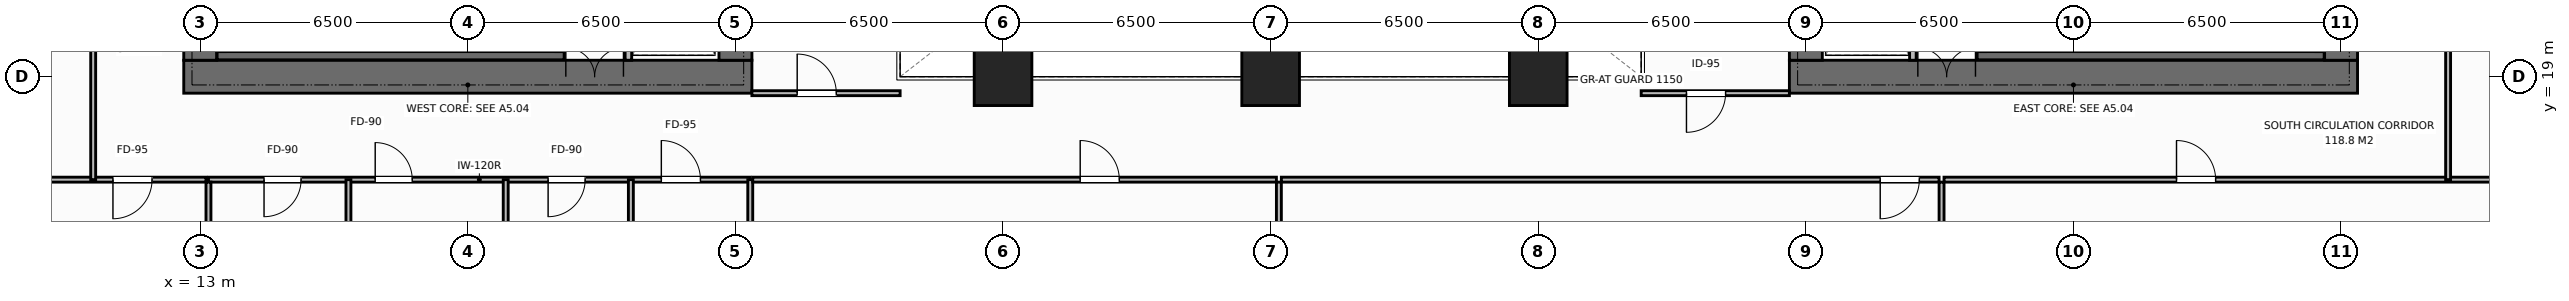
"""IFC4 building model, lengths in metres.
Left out: names, types, materials, properties, quantities, classifications, styles, units other than length and angle.
Written with IfcOpenShell. Run it as: python <this file> out.ifc"""

import sys

from ifc_helpers import new_model, si_unit, direction, frame, frame_2d, origin, origin_2d, place, context, subcontext, project, spatial, rectangle, extrude, element, fill, save


model = new_model("IFC4")
c1 = context("Model", 3, precision=1e-05, world=origin(), true_north=direction((0.0, 1.0)))
c2 = subcontext(c1, "Body", "Model", "MODEL_VIEW")
j1 = project(units=[si_unit("LENGTHUNIT", "METRE"), si_unit("PLANEANGLEUNIT", "RADIAN")], contexts=[c1])
p1 = place(None, origin())
s1 = spatial("IfcSite", under=j1, at=p1, CompositionType="ELEMENT")
p2 = place(p1, origin())
s2 = spatial("IfcBuilding", under=s1, at=p2, CompositionType="ELEMENT")
p3 = place(p2, frame((0.0, 0.0, 46.8)))
s3 = spatial("IfcBuildingStorey", under=s2, at=p3, CompositionType="ELEMENT", Elevation=46.8)
p4 = place(p3, frame((12.6, 19.0, 0.0), z_axis=(0.0, 0.0, 1.0), x_axis=(1.0, 0.0, 0.0)))
e1 = element("IfcWall", 1, at=p4, inside=s3, PredefinedType="SHEAR", context=c2, shape_type="SweptSolid", body=[
    extrude(rectangle(XDim=13.8, YDim=0.8, at=frame_2d((6.9, 0.0))), origin(), (0.0, 0.0, 1.0), 3.8),
])
p5 = place(p4, frame((9.28, 0.0, 0.0)))
e2 = element("IfcOpeningElement", 2, at=p5, cuts=e1, PredefinedType="OPENING", context=c2, shape_type="SweptSolid", body=[
    extrude(rectangle(XDim=1.4, YDim=2.2, at=frame_2d((0.7, 1.1))), frame((0.0, 0.41, 0.0), z_axis=(0.0, -1.0, 0.0), x_axis=(1.0, 0.0, 0.0)), (0.0, 0.0, 1.0), 0.82),
])
p6 = place(p3, frame((13.0, 19.4, 0.0), z_axis=(0.0, 0.0, 1.0), x_axis=(0.0, 1.0, 0.0)))
e3 = element("IfcWall", 3, at=p6, inside=s3, PredefinedType="SHEAR", context=c2, shape_type="SweptSolid", body=[
    extrude(rectangle(XDim=13.2, YDim=0.8, at=frame_2d((6.6, 0.0))), origin(), (0.0, 0.0, 1.0), 3.8),
])
p7 = place(p6, frame((4.65, 0.0, 0.0)))
e4 = element("IfcOpeningElement", 4, at=p7, cuts=e3, PredefinedType="OPENING", context=c2, shape_type="SweptSolid", body=[
    extrude(rectangle(XDim=1.4, YDim=2.2, at=frame_2d((0.7, 1.1))), frame((0.0, 0.41, 0.0), z_axis=(0.0, -1.0, 0.0), x_axis=(1.0, 0.0, 0.0)), (0.0, 0.0, 1.0), 0.82),
])
p8 = place(p3, frame((26.0, 19.4, 0.0), z_axis=(0.0, 0.0, 1.0), x_axis=(0.0, 1.0, 0.0)))
e5 = element("IfcWall", 5, at=p8, inside=s3, PredefinedType="SHEAR", context=c2, shape_type="SweptSolid", body=[
    extrude(rectangle(XDim=13.2, YDim=0.8, at=frame_2d((6.6, 0.0))), origin(), (0.0, 0.0, 1.0), 3.8),
])
p9 = place(p3, frame((51.6, 19.0, 0.0), z_axis=(0.0, 0.0, 1.0), x_axis=(1.0, 0.0, 0.0)))
e6 = element("IfcWall", 6, at=p9, inside=s3, PredefinedType="SHEAR", context=c2, shape_type="SweptSolid", body=[
    extrude(rectangle(XDim=13.8, YDim=0.8, at=frame_2d((6.9, 0.0))), origin(), (0.0, 0.0, 1.0), 3.8),
])
p10 = place(p9, frame((3.12, 0.0, 0.0)))
e7 = element("IfcOpeningElement", 7, at=p10, cuts=e6, PredefinedType="OPENING", context=c2, shape_type="SweptSolid", body=[
    extrude(rectangle(XDim=1.4, YDim=2.2, at=frame_2d((0.7, 1.1))), frame((0.0, 0.41, 0.0), z_axis=(0.0, -1.0, 0.0), x_axis=(1.0, 0.0, 0.0)), (0.0, 0.0, 1.0), 0.82),
])
p11 = place(p3, frame((52.0, 19.4, 0.0), z_axis=(0.0, 0.0, 1.0), x_axis=(0.0, 1.0, 0.0)))
e8 = element("IfcWall", 8, at=p11, inside=s3, PredefinedType="SHEAR", context=c2, shape_type="SweptSolid", body=[
    extrude(rectangle(XDim=13.2, YDim=0.8, at=frame_2d((6.6, 0.0))), origin(), (0.0, 0.0, 1.0), 3.8),
])
p12 = place(p3, frame((65.0, 19.4, 0.0), z_axis=(0.0, 0.0, 1.0), x_axis=(0.0, 1.0, 0.0)))
e9 = element("IfcWall", 9, at=p12, inside=s3, PredefinedType="SHEAR", context=c2, shape_type="SweptSolid", body=[
    extrude(rectangle(XDim=13.2, YDim=0.8, at=frame_2d((6.6, 0.0))), origin(), (0.0, 0.0, 1.0), 3.8),
])
p13 = place(p12, frame((8.05, 0.0, 0.0)))
e10 = element("IfcOpeningElement", 10, at=p13, cuts=e9, PredefinedType="OPENING", context=c2, shape_type="SweptSolid", body=[
    extrude(rectangle(XDim=1.3, YDim=2.2, at=frame_2d((0.65, 1.1))), frame((0.0, 0.41, 0.0), z_axis=(0.0, -1.0, 0.0), x_axis=(1.0, 0.0, 0.0)), (0.0, 0.0, 1.0), 0.82),
])
for number, where, z_axis, x_axis in (
    (11, (13.41, 19.51, 0.0), (0.0, 0.0, 1.0), (1.0, 0.0, 0.0)),
    (12, (56.16, 19.51, 0.0), (0.0, 0.0, 1.0), (1.0, 0.0, 0.0)),
):
    element("IfcWall", number, at=place(p3, frame(where, z_axis=z_axis, x_axis=x_axis)), inside=s3, PredefinedType="SHEAR", context=c2, shape_type="SweptSolid", body=[
        extrude(rectangle(XDim=8.43, YDim=0.2, at=frame_2d((4.215, 0.0))), origin(), (0.0, 0.0, 1.0), 3.8),
    ])
for number, where, z_axis, x_axis in (
    (13, (32.5, 19.0, 0.0), (0.0, 0.0, 1.0), (1.0, 0.0, 0.0)),
    (14, (39.0, 19.0, 0.0), (0.0, 0.0, 1.0), (1.0, 0.0, 0.0)),
    (15, (45.5, 19.0, 0.0), (0.0, 0.0, 1.0), (1.0, 0.0, 0.0)),
):
    element("IfcColumn", number, at=place(p3, frame(where, z_axis=z_axis, x_axis=x_axis)), inside=s3, PredefinedType="COLUMN", context=c2, shape_type="SweptSolid", body=[
        extrude(rectangle(XDim=1.4, YDim=1.4, at=origin_2d()), origin(), (0.0, 0.0, 1.0), 3.8),
    ])
p14 = place(p3, frame((23.4, 19.4, 0.0), z_axis=(0.0, 0.0, 1.0), x_axis=(0.0, 1.0, 0.0)))
e16 = element("IfcWall", 16, at=p14, inside=s3, PredefinedType="STANDARD", context=c2, shape_type="SweptSolid", body=[
    extrude(rectangle(XDim=13.2, YDim=0.16, at=frame_2d((6.6, 0.0))), origin(), (0.0, 0.0, 1.0), 3.55),
])
p15 = place(p14, frame((0.55, 0.0, 0.0)))
e17 = element("IfcOpeningElement", 17, at=p15, cuts=e16, PredefinedType="OPENING", context=c2, shape_type="SweptSolid", body=[
    extrude(rectangle(XDim=1.1, YDim=2.2, at=frame_2d((0.55, 1.1))), frame((0.0, 0.09, 0.0), z_axis=(0.0, -1.0, 0.0), x_axis=(1.0, 0.0, 0.0)), (0.0, 0.0, 1.0), 0.18),
])
p16 = place(p14, frame((2.7, 0.0, 0.0)))
e18 = element("IfcOpeningElement", 18, at=p16, cuts=e16, PredefinedType="OPENING", context=c2, shape_type="SweptSolid", body=[
    extrude(rectangle(XDim=1.1, YDim=2.2, at=frame_2d((0.55, 1.1))), frame((0.0, 0.09, 0.0), z_axis=(0.0, -1.0, 0.0), x_axis=(1.0, 0.0, 0.0)), (0.0, 0.0, 1.0), 0.18),
])
p17 = place(p3, frame((54.6, 19.4, 0.0), z_axis=(0.0, 0.0, 1.0), x_axis=(0.0, 1.0, 0.0)))
e19 = element("IfcWall", 19, at=p17, inside=s3, PredefinedType="STANDARD", context=c2, shape_type="SweptSolid", body=[
    extrude(rectangle(XDim=13.2, YDim=0.16, at=frame_2d((6.6, 0.0))), origin(), (0.0, 0.0, 1.0), 3.55),
])
p18 = place(p17, frame((0.55, 0.0, 0.0)))
e20 = element("IfcOpeningElement", 20, at=p18, cuts=e19, PredefinedType="OPENING", context=c2, shape_type="SweptSolid", body=[
    extrude(rectangle(XDim=1.1, YDim=2.2, at=frame_2d((0.55, 1.1))), frame((0.0, 0.09, 0.0), z_axis=(0.0, -1.0, 0.0), x_axis=(1.0, 0.0, 0.0)), (0.0, 0.0, 1.0), 0.18),
])
p19 = place(p17, frame((2.7, 0.0, 0.0)))
e21 = element("IfcOpeningElement", 21, at=p19, cuts=e19, PredefinedType="OPENING", context=c2, shape_type="SweptSolid", body=[
    extrude(rectangle(XDim=1.1, YDim=2.2, at=frame_2d((0.55, 1.1))), frame((0.0, 0.09, 0.0), z_axis=(0.0, -1.0, 0.0), x_axis=(1.0, 0.0, 0.0)), (0.0, 0.0, 1.0), 0.18),
])
p20 = place(p3, frame((26.4, 18.6, 0.0), z_axis=(0.0, 0.0, 1.0), x_axis=(1.0, 0.0, 0.0)))
e22 = element("IfcWall", 22, at=p20, inside=s3, PredefinedType="PARTITIONING", context=c2, shape_type="SweptSolid", body=[
    extrude(rectangle(XDim=3.6, YDim=0.12, at=frame_2d((1.8, 0.0))), origin(), (0.0, 0.0, 1.0), 3.55),
])
p21 = place(p20, frame((1.1, 0.0, 0.0)))
e23 = element("IfcOpeningElement", 23, at=p21, cuts=e22, PredefinedType="OPENING", context=c2, shape_type="SweptSolid", body=[
    extrude(rectangle(XDim=0.95, YDim=2.15, at=frame_2d((0.475, 1.075))), frame((0.0, 0.07, 0.0), z_axis=(0.0, -1.0, 0.0), x_axis=(1.0, 0.0, 0.0)), (0.0, 0.0, 1.0), 0.14),
])
p22 = place(p3, frame((48.0, 18.6, 0.0), z_axis=(0.0, 0.0, 1.0), x_axis=(1.0, 0.0, 0.0)))
e24 = element("IfcWall", 24, at=p22, inside=s3, PredefinedType="PARTITIONING", context=c2, shape_type="SweptSolid", body=[
    extrude(rectangle(XDim=3.6, YDim=0.12, at=frame_2d((1.8, 0.0))), origin(), (0.0, 0.0, 1.0), 3.55),
])
p23 = place(p22, frame((1.1, 0.0, 0.0)))
e25 = element("IfcOpeningElement", 25, at=p23, cuts=e24, PredefinedType="OPENING", context=c2, shape_type="SweptSolid", body=[
    extrude(rectangle(XDim=0.95, YDim=2.15, at=frame_2d((0.475, 1.075))), frame((0.0, 0.07, 0.0), z_axis=(0.0, -1.0, 0.0), x_axis=(1.0, 0.0, 0.0)), (0.0, 0.0, 1.0), 0.14),
])
p24 = place(p3, frame((13.2, 16.5, 0.0), z_axis=(0.0, 0.0, 1.0), x_axis=(1.0, 0.0, 0.0)))
e26 = element("IfcWall", 26, at=p24, inside=s3, PredefinedType="PARTITIONING", context=c2, shape_type="SweptSolid", body=[
    extrude(rectangle(XDim=13.16, YDim=0.12, at=frame_2d((6.58, 0.0))), origin(), (0.0, 0.0, 1.0), 3.55),
])
p25 = place(p24, frame((1.35, 0.0, 0.0)))
e27 = element("IfcOpeningElement", 27, at=p25, cuts=e26, PredefinedType="OPENING", context=c2, shape_type="SweptSolid", body=[
    extrude(rectangle(XDim=0.9, YDim=2.15, at=frame_2d((0.45, 1.075))), frame((0.0, 0.07, 0.0), z_axis=(0.0, -1.0, 0.0), x_axis=(1.0, 0.0, 0.0)), (0.0, 0.0, 1.0), 0.14),
])
p26 = place(p24, frame((4.05, 0.0, 0.0)))
e28 = element("IfcOpeningElement", 28, at=p26, cuts=e26, PredefinedType="OPENING", context=c2, shape_type="SweptSolid", body=[
    extrude(rectangle(XDim=0.9, YDim=2.15, at=frame_2d((0.45, 1.075))), frame((0.0, 0.07, 0.0), z_axis=(0.0, -1.0, 0.0), x_axis=(1.0, 0.0, 0.0)), (0.0, 0.0, 1.0), 0.14),
])
p27 = place(p24, frame((8.25, 0.0, 0.0)))
e29 = element("IfcOpeningElement", 29, at=p27, cuts=e26, PredefinedType="OPENING", context=c2, shape_type="SweptSolid", body=[
    extrude(rectangle(XDim=0.9, YDim=2.15, at=frame_2d((0.45, 1.075))), frame((0.0, 0.07, 0.0), z_axis=(0.0, -1.0, 0.0), x_axis=(1.0, 0.0, 0.0)), (0.0, 0.0, 1.0), 0.14),
])
p28 = place(p24, frame((11.0, 0.0, 0.0)))
e30 = element("IfcOpeningElement", 30, at=p28, cuts=e26, PredefinedType="OPENING", context=c2, shape_type="SweptSolid", body=[
    extrude(rectangle(XDim=0.95, YDim=2.15, at=frame_2d((0.475, 1.075))), frame((0.0, 0.07, 0.0), z_axis=(0.0, -1.0, 0.0), x_axis=(1.0, 0.0, 0.0)), (0.0, 0.0, 1.0), 0.14),
])
for number, where, z_axis, x_axis in (
    (31, (16.6, 13.82, 0.0), (0.0, 0.0, 1.0), (0.0, 1.0, 0.0)),
    (32, (20.42, 13.82, 0.0), (0.0, 0.0, 1.0), (0.0, 1.0, 0.0)),
    (33, (23.46, 13.82, 0.0), (0.0, 0.0, 1.0), (0.0, 1.0, 0.0)),
    (34, (26.36, 13.82, 0.0), (0.0, 0.0, 1.0), (0.0, 1.0, 0.0)),
):
    element("IfcWall", number, at=place(p3, frame(where, z_axis=z_axis, x_axis=x_axis)), inside=s3, PredefinedType="PARTITIONING", context=c2, shape_type="SweptSolid", body=[
        extrude(rectangle(XDim=2.68, YDim=0.12, at=frame_2d((1.34, 0.0))), origin(), (0.0, 0.0, 1.0), 3.55),
    ])
p29 = place(p3, frame((13.2, 0.02, 0.0), z_axis=(0.0, 0.0, 1.0), x_axis=(0.0, 1.0, 0.0)))
e35 = element("IfcWall", 35, at=p29, inside=s3, PredefinedType="PARTITIONING", context=c2, shape_type="SweptSolid", body=[
    extrude(rectangle(XDim=16.42, YDim=0.12, at=frame_2d((8.21, 0.0))), origin(), (0.0, 0.0, 1.0), 2.9),
])
p30 = place(p3, frame((-0.02, 16.5, 0.0), z_axis=(0.0, 0.0, 1.0), x_axis=(1.0, 0.0, 0.0)))
e36 = element("IfcWall", 36, at=p30, inside=s3, PredefinedType="PARTITIONING", context=c2, shape_type="SweptSolid", body=[
    extrude(rectangle(XDim=13.16, YDim=0.12, at=frame_2d((6.58, 0.0))), origin(), (0.0, 0.0, 1.0), 3.55),
])
p31 = place(p30, frame((10.9, 0.0, 0.0)))
e37 = element("IfcOpeningElement", 37, at=p31, cuts=e36, PredefinedType="OPENING", context=c2, shape_type="SweptSolid", body=[
    extrude(rectangle(XDim=0.95, YDim=2.15, at=frame_2d((0.475, 1.075))), frame((0.0, 0.07, 0.0), z_axis=(0.0, -1.0, 0.0), x_axis=(1.0, 0.0, 0.0)), (0.0, 0.0, 1.0), 0.14),
])
p32 = place(p3, frame((39.2, 0.02, 0.0), z_axis=(0.0, 0.0, 1.0), x_axis=(0.0, 1.0, 0.0)))
e38 = element("IfcWall", 38, at=p32, inside=s3, PredefinedType="PARTITIONING", context=c2, shape_type="SweptSolid", body=[
    extrude(rectangle(XDim=16.42, YDim=0.12, at=frame_2d((8.21, 0.0))), origin(), (0.0, 0.0, 1.0), 2.9),
])
p33 = place(p3, frame((26.42, 16.5, 0.0), z_axis=(0.0, 0.0, 1.0), x_axis=(1.0, 0.0, 0.0)))
e39 = element("IfcWall", 39, at=p33, inside=s3, PredefinedType="PARTITIONING", context=c2, shape_type="SweptSolid", body=[
    extrude(rectangle(XDim=12.72, YDim=0.12, at=frame_2d((6.36, 0.0))), origin(), (0.0, 0.0, 1.0), 3.55),
])
p34 = place(p33, frame((7.954, 0.0, 0.0)))
e40 = element("IfcOpeningElement", 40, at=p34, cuts=e39, PredefinedType="OPENING", context=c2, shape_type="SweptSolid", body=[
    extrude(rectangle(XDim=0.95, YDim=2.15, at=frame_2d((0.475, 1.075))), frame((0.0, 0.07, 0.0), z_axis=(0.0, -1.0, 0.0), x_axis=(1.0, 0.0, 0.0)), (0.0, 0.0, 1.0), 0.14),
])
p35 = place(p3, frame((55.296, 0.02, 0.0), z_axis=(0.0, 0.0, 1.0), x_axis=(0.0, 1.0, 0.0)))
e41 = element("IfcWall", 41, at=p35, inside=s3, PredefinedType="PARTITIONING", context=c2, shape_type="SweptSolid", body=[
    extrude(rectangle(XDim=16.42, YDim=0.12, at=frame_2d((8.21, 0.0))), origin(), (0.0, 0.0, 1.0), 3.55),
])
p36 = place(p3, frame((39.26, 16.5, 0.0), z_axis=(0.0, 0.0, 1.0), x_axis=(1.0, 0.0, 0.0)))
e42 = element("IfcWall", 42, at=p36, inside=s3, PredefinedType="PARTITIONING", context=c2, shape_type="SweptSolid", body=[
    extrude(rectangle(XDim=15.976, YDim=0.12, at=frame_2d((7.988, 0.0))), origin(), (0.0, 0.0, 1.0), 3.55),
])
p37 = place(p36, frame((14.546, 0.0, 0.0)))
e43 = element("IfcOpeningElement", 43, at=p37, cuts=e42, PredefinedType="OPENING", context=c2, shape_type="SweptSolid", body=[
    extrude(rectangle(XDim=0.95, YDim=2.15, at=frame_2d((0.475, 1.075))), frame((0.0, 0.07, 0.0), z_axis=(0.0, -1.0, 0.0), x_axis=(1.0, 0.0, 0.0)), (0.0, 0.0, 1.0), 0.14),
])
p38 = place(p3, frame((55.356, 16.5, 0.0), z_axis=(0.0, 0.0, 1.0), x_axis=(1.0, 0.0, 0.0)))
e44 = element("IfcWall", 44, at=p38, inside=s3, PredefinedType="PARTITIONING", context=c2, shape_type="SweptSolid", body=[
    extrude(rectangle(XDim=22.664, YDim=0.12, at=frame_2d((11.332, 0.0))), origin(), (0.0, 0.0, 1.0), 3.55),
])
p39 = place(p38, frame((5.647, 0.0, 0.0)))
e45 = element("IfcOpeningElement", 45, at=p39, cuts=e44, PredefinedType="OPENING", context=c2, shape_type="SweptSolid", body=[
    extrude(rectangle(XDim=0.95, YDim=2.15, at=frame_2d((0.475, 1.075))), frame((0.0, 0.07, 0.0), z_axis=(0.0, -1.0, 0.0), x_axis=(1.0, 0.0, 0.0)), (0.0, 0.0, 1.0), 0.14),
])
p40 = place(p3, frame((10.4, 16.5, 0.0), z_axis=(0.0, 0.0, 1.0), x_axis=(0.0, 1.0, 0.0)))
e46 = element("IfcWall", 46, at=p40, inside=s3, PredefinedType="PARTITIONING", context=c2, shape_type="SweptSolid", body=[
    extrude(rectangle(XDim=9.5, YDim=0.12, at=frame_2d((4.75, 0.0))), origin(), (0.0, 0.0, 1.0), 3.55),
])
p41 = place(p40, frame((5.325, 0.0, 0.0)))
e47 = element("IfcOpeningElement", 47, at=p41, cuts=e46, PredefinedType="OPENING", context=c2, shape_type="SweptSolid", body=[
    extrude(rectangle(XDim=0.95, YDim=2.15, at=frame_2d((0.475, 1.075))), frame((0.0, 0.07, 0.0), z_axis=(0.0, -1.0, 0.0), x_axis=(1.0, 0.0, 0.0)), (0.0, 0.0, 1.0), 0.14),
])
p42 = place(p3, frame((67.6, 16.5, 0.0), z_axis=(0.0, 0.0, 1.0), x_axis=(0.0, 1.0, 0.0)))
e48 = element("IfcWall", 48, at=p42, inside=s3, PredefinedType="PARTITIONING", context=c2, shape_type="SweptSolid", body=[
    extrude(rectangle(XDim=19.0, YDim=0.12, at=frame_2d((9.5, 0.0))), origin(), (0.0, 0.0, 1.0), 3.55),
])
p43 = place(p42, frame((9.025, 0.0, 0.0)))
e49 = element("IfcOpeningElement", 49, at=p43, cuts=e48, PredefinedType="OPENING", context=c2, shape_type="SweptSolid", body=[
    extrude(rectangle(XDim=0.95, YDim=2.15, at=frame_2d((0.475, 1.075))), frame((0.0, 0.07, 0.0), z_axis=(0.0, -1.0, 0.0), x_axis=(1.0, 0.0, 0.0)), (0.0, 0.0, 1.0), 0.14),
])
p44 = place(p5, origin())
e50 = element("IfcDoor", 50, at=p44, inside=s3, OperationType="DOUBLE_DOOR_SINGLE_SWING", PredefinedType="DOOR", context=c2, shape_type="SweptSolid", body=[
    extrude(rectangle(XDim=1.4, YDim=2.2, at=frame_2d((0.7, 1.1))), frame((0.0, 0.125, 0.0), z_axis=(0.0, -1.0, 0.0), x_axis=(1.0, 0.0, 0.0)), (0.0, 0.0, 1.0), 0.05),
])
fill(e2, e50)
p45 = place(p10, origin())
e51 = element("IfcDoor", 51, at=p45, inside=s3, OperationType="DOUBLE_DOOR_SINGLE_SWING", PredefinedType="DOOR", context=c2, shape_type="SweptSolid", body=[
    extrude(rectangle(XDim=1.4, YDim=2.2, at=frame_2d((0.7, 1.1))), frame((0.0, 0.125, 0.0), z_axis=(0.0, -1.0, 0.0), x_axis=(1.0, 0.0, 0.0)), (0.0, 0.0, 1.0), 0.05),
])
fill(e7, e51)
p46 = place(p21, origin())
e52 = element("IfcDoor", 52, at=p46, inside=s3, OperationType="SINGLE_SWING_LEFT", PredefinedType="DOOR", context=c2, shape_type="SweptSolid", body=[
    extrude(rectangle(XDim=0.95, YDim=2.15, at=frame_2d((0.475, 1.075))), frame((0.0, 0.025, 0.0), z_axis=(0.0, -1.0, 0.0), x_axis=(1.0, 0.0, 0.0)), (0.0, 0.0, 1.0), 0.05),
])
fill(e23, e52)
p47 = place(p23, origin())
e53 = element("IfcDoor", 53, at=p47, inside=s3, OperationType="SINGLE_SWING_RIGHT", PredefinedType="DOOR", context=c2, shape_type="SweptSolid", body=[
    extrude(rectangle(XDim=0.95, YDim=2.15, at=frame_2d((0.475, 1.075))), frame((0.0, 0.025, 0.0), z_axis=(0.0, -1.0, 0.0), x_axis=(1.0, 0.0, 0.0)), (0.0, 0.0, 1.0), 0.05),
])
fill(e25, e53)
p48 = place(p25, origin())
e54 = element("IfcDoor", 54, at=p48, inside=s3, OperationType="SINGLE_SWING_RIGHT", PredefinedType="DOOR", context=c2, shape_type="SweptSolid", body=[
    extrude(rectangle(XDim=0.9, YDim=2.15, at=frame_2d((0.45, 1.075))), frame((0.0, 0.025, 0.0), z_axis=(0.0, -1.0, 0.0), x_axis=(1.0, 0.0, 0.0)), (0.0, 0.0, 1.0), 0.05),
])
fill(e27, e54)
p49 = place(p26, origin())
e55 = element("IfcDoor", 55, at=p49, inside=s3, OperationType="SINGLE_SWING_LEFT", PredefinedType="DOOR", context=c2, shape_type="SweptSolid", body=[
    extrude(rectangle(XDim=0.9, YDim=2.15, at=frame_2d((0.45, 1.075))), frame((0.0, 0.025, 0.0), z_axis=(0.0, -1.0, 0.0), x_axis=(1.0, 0.0, 0.0)), (0.0, 0.0, 1.0), 0.05),
])
fill(e28, e55)
p50 = place(p27, origin())
e56 = element("IfcDoor", 56, at=p50, inside=s3, OperationType="SINGLE_SWING_RIGHT", PredefinedType="DOOR", context=c2, shape_type="SweptSolid", body=[
    extrude(rectangle(XDim=0.9, YDim=2.15, at=frame_2d((0.45, 1.075))), frame((0.0, 0.025, 0.0), z_axis=(0.0, -1.0, 0.0), x_axis=(1.0, 0.0, 0.0)), (0.0, 0.0, 1.0), 0.05),
])
fill(e29, e56)
p51 = place(p28, origin())
e57 = element("IfcDoor", 57, at=p51, inside=s3, OperationType="SINGLE_SWING_LEFT", PredefinedType="DOOR", context=c2, shape_type="SweptSolid", body=[
    extrude(rectangle(XDim=0.95, YDim=2.15, at=frame_2d((0.475, 1.075))), frame((0.0, 0.025, 0.0), z_axis=(0.0, -1.0, 0.0), x_axis=(1.0, 0.0, 0.0)), (0.0, 0.0, 1.0), 0.05),
])
fill(e30, e57)
p52 = place(p31, origin())
e58 = element("IfcDoor", 58, at=p52, inside=s3, OperationType="SINGLE_SWING_RIGHT", PredefinedType="DOOR", context=c2, shape_type="SweptSolid", body=[
    extrude(rectangle(XDim=0.95, YDim=2.15, at=frame_2d((0.475, 1.075))), frame((0.0, 0.025, 0.0), z_axis=(0.0, -1.0, 0.0), x_axis=(1.0, 0.0, 0.0)), (0.0, 0.0, 1.0), 0.05),
])
fill(e37, e58)
p53 = place(p34, origin())
e59 = element("IfcDoor", 59, at=p53, inside=s3, OperationType="SINGLE_SWING_LEFT", PredefinedType="DOOR", context=c2, shape_type="SweptSolid", body=[
    extrude(rectangle(XDim=0.95, YDim=2.15, at=frame_2d((0.475, 1.075))), frame((0.0, 0.025, 0.0), z_axis=(0.0, -1.0, 0.0), x_axis=(1.0, 0.0, 0.0)), (0.0, 0.0, 1.0), 0.05),
])
fill(e40, e59)
p54 = place(p37, origin())
e60 = element("IfcDoor", 60, at=p54, inside=s3, OperationType="SINGLE_SWING_RIGHT", PredefinedType="DOOR", context=c2, shape_type="SweptSolid", body=[
    extrude(rectangle(XDim=0.95, YDim=2.15, at=frame_2d((0.475, 1.075))), frame((0.0, 0.025, 0.0), z_axis=(0.0, -1.0, 0.0), x_axis=(1.0, 0.0, 0.0)), (0.0, 0.0, 1.0), 0.05),
])
fill(e43, e60)
p55 = place(p39, origin())
e61 = element("IfcDoor", 61, at=p55, inside=s3, OperationType="SINGLE_SWING_LEFT", PredefinedType="DOOR", context=c2, shape_type="SweptSolid", body=[
    extrude(rectangle(XDim=0.95, YDim=2.15, at=frame_2d((0.475, 1.075))), frame((0.0, 0.025, 0.0), z_axis=(0.0, -1.0, 0.0), x_axis=(1.0, 0.0, 0.0)), (0.0, 0.0, 1.0), 0.05),
])
fill(e45, e61)
save(model, sys.argv[1])
